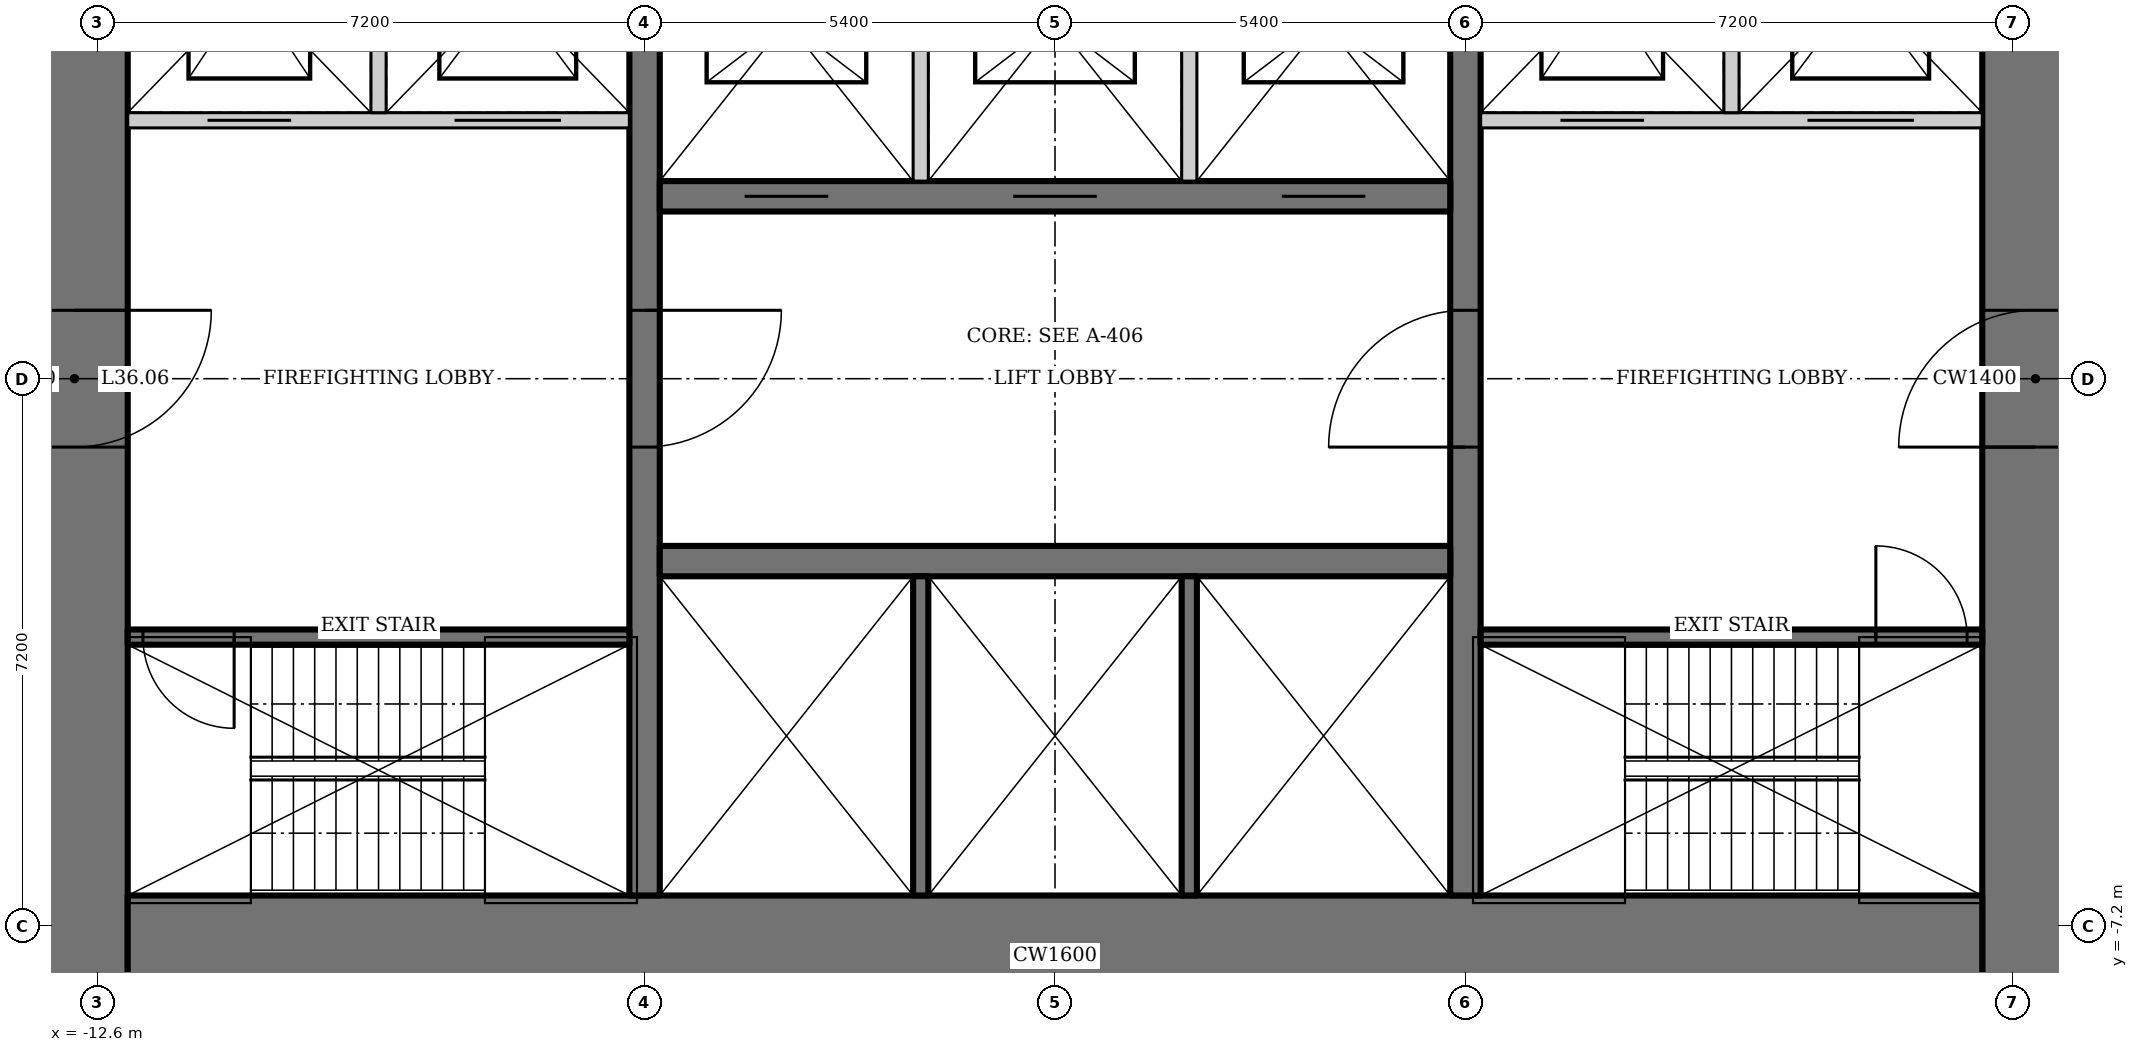
"""IFC4 building model, lengths in metres.
Left out: names, types, materials, properties, quantities, classifications, styles, units other than length and angle.
Written with IfcOpenShell. Run it as: python <this file> out.ifc"""

import sys

from ifc_helpers import new_model, si_unit, direction, frame, frame_2d, origin, place, context, subcontext, project, spatial, rectangle, extrude, element, fill, save


model = new_model("IFC4")
c1 = context("Model", 3, precision=1e-05, world=origin(), true_north=direction((0.0, 1.0)))
c2 = subcontext(c1, "Body", "Model", "MODEL_VIEW")
j1 = project(units=[si_unit("LENGTHUNIT", "METRE"), si_unit("PLANEANGLEUNIT", "RADIAN")], contexts=[c1])
p1 = place(None, origin())
s1 = spatial("IfcSite", under=j1, at=p1, CompositionType="ELEMENT")
p2 = place(p1, origin())
s2 = spatial("IfcBuilding", under=s1, at=p2, CompositionType="ELEMENT")
p3 = place(p2, frame((0.0, 0.0, 155.2)))
s3 = spatial("IfcBuildingStorey", under=s2, at=p3, CompositionType="ELEMENT", Elevation=155.2)
p4 = place(p3, frame((12.9, -13.0, 0.0), z_axis=(0.0, 0.0, 1.0), x_axis=(0.0, 1.0, 0.0)))
e1 = element("IfcWall", 1, at=p4, inside=s3, PredefinedType="SHEAR", context=c2, shape_type="SweptSolid", body=[
    extrude(rectangle(XDim=26.0, YDim=1.4, at=frame_2d((13.0, 0.0))), origin(), (0.0, 0.0, 1.0), 4.2),
])
p5 = place(p4, frame((12.1, 0.0, 0.0)))
e2 = element("IfcOpeningElement", 2, at=p5, cuts=e1, PredefinedType="OPENING", context=c2, shape_type="SweptSolid", body=[
    extrude(rectangle(XDim=1.8, YDim=2.1, at=frame_2d((0.9, 1.05))), frame((0.0, 0.71, 0.0), z_axis=(0.0, -1.0, 0.0), x_axis=(1.0, 0.0, 0.0)), (0.0, 0.0, 1.0), 1.42),
])
p6 = place(p3, frame((-12.9, 13.0, 0.0), z_axis=(0.0, 0.0, 1.0), x_axis=(0.0, -1.0, 0.0)))
e3 = element("IfcWall", 3, at=p6, inside=s3, PredefinedType="SHEAR", context=c2, shape_type="SweptSolid", body=[
    extrude(rectangle(XDim=26.0, YDim=1.4, at=frame_2d((13.0, 0.0))), origin(), (0.0, 0.0, 1.0), 4.2),
])
p7 = place(p6, frame((12.1, 0.0, 0.0)))
e4 = element("IfcOpeningElement", 4, at=p7, cuts=e3, PredefinedType="OPENING", context=c2, shape_type="SweptSolid", body=[
    extrude(rectangle(XDim=1.8, YDim=2.1, at=frame_2d((0.9, 1.05))), frame((0.0, 0.71, 0.0), z_axis=(0.0, -1.0, 0.0), x_axis=(1.0, 0.0, 0.0)), (0.0, 0.0, 1.0), 1.42),
])
p8 = place(p3, frame((-12.2, -7.6, 0.0), z_axis=(0.0, 0.0, 1.0), x_axis=(1.0, 0.0, 0.0)))
e5 = element("IfcWall", 5, at=p8, inside=s3, PredefinedType="SHEAR", context=c2, shape_type="SweptSolid", body=[
    extrude(rectangle(XDim=24.4, YDim=1.6, at=frame_2d((12.2, 0.0))), origin(), (0.0, 0.0, 1.0), 4.2),
])
p9 = place(p3, frame((5.4, -6.8, 0.0), z_axis=(0.0, 0.0, 1.0), x_axis=(0.0, 1.0, 0.0)))
e6 = element("IfcWall", 6, at=p9, inside=s3, PredefinedType="SHEAR", context=c2, shape_type="SweptSolid", body=[
    extrude(rectangle(XDim=13.6, YDim=0.4, at=frame_2d((6.8, 0.0))), origin(), (0.0, 0.0, 1.0), 4.2),
])
p10 = place(p9, frame((5.9, 0.0, 0.0)))
e7 = element("IfcOpeningElement", 7, at=p10, cuts=e6, PredefinedType="OPENING", context=c2, shape_type="SweptSolid", body=[
    extrude(rectangle(XDim=1.8, YDim=2.1, at=frame_2d((0.9, 1.05))), frame((0.0, 0.21, 0.0), z_axis=(0.0, -1.0, 0.0), x_axis=(1.0, 0.0, 0.0)), (0.0, 0.0, 1.0), 0.42),
])
p11 = place(p3, frame((-5.4, 6.8, 0.0), z_axis=(0.0, 0.0, 1.0), x_axis=(0.0, -1.0, 0.0)))
e8 = element("IfcWall", 8, at=p11, inside=s3, PredefinedType="SHEAR", context=c2, shape_type="SweptSolid", body=[
    extrude(rectangle(XDim=13.6, YDim=0.4, at=frame_2d((6.8, 0.0))), origin(), (0.0, 0.0, 1.0), 4.2),
])
p12 = place(p11, frame((5.9, 0.0, 0.0)))
e9 = element("IfcOpeningElement", 9, at=p12, cuts=e8, PredefinedType="OPENING", context=c2, shape_type="SweptSolid", body=[
    extrude(rectangle(XDim=1.8, YDim=2.1, at=frame_2d((0.9, 1.05))), frame((0.0, 0.21, 0.0), z_axis=(0.0, -1.0, 0.0), x_axis=(1.0, 0.0, 0.0)), (0.0, 0.0, 1.0), 0.42),
])
p13 = place(p3, frame((-5.2, -2.4, 0.0), z_axis=(0.0, 0.0, 1.0), x_axis=(1.0, 0.0, 0.0)))
e10 = element("IfcWall", 10, at=p13, inside=s3, PredefinedType="SHEAR", context=c2, shape_type="SweptSolid", body=[
    extrude(rectangle(XDim=10.4, YDim=0.4, at=frame_2d((5.2, 0.0))), origin(), (0.0, 0.0, 1.0), 4.2),
])
for number, where, z_axis, x_axis in (
    (11, (-1.767, -2.6, 0.0), (0.0, 0.0, 1.0), (0.0, -1.0, 0.0)),
    (12, (1.767, -2.6, 0.0), (0.0, 0.0, 1.0), (0.0, -1.0, 0.0)),
):
    element("IfcWall", number, at=place(p3, frame(where, z_axis=z_axis, x_axis=x_axis)), inside=s3, PredefinedType="SOLIDWALL", context=c2, shape_type="SweptSolid", body=[
        extrude(rectangle(XDim=4.2, YDim=0.2, at=frame_2d((2.1, 0.0))), origin(), (0.0, 0.0, 1.0), 4.2),
    ])
p14 = place(p3, frame((5.2, 2.4, 0.0), z_axis=(0.0, 0.0, 1.0), x_axis=(-1.0, 0.0, 0.0)))
e13 = element("IfcWall", 13, at=p14, inside=s3, PredefinedType="SHEAR", context=c2, shape_type="SweptSolid", body=[
    extrude(rectangle(XDim=10.4, YDim=0.4, at=frame_2d((5.2, 0.0))), origin(), (0.0, 0.0, 1.0), 4.2),
])
p15 = place(p14, frame((8.183, 0.0, 0.0)))
e14 = element("IfcOpeningElement", 14, at=p15, cuts=e13, PredefinedType="OPENING", context=c2, shape_type="SweptSolid", body=[
    extrude(rectangle(XDim=1.1, YDim=2.2, at=frame_2d((0.55, 1.1))), frame((0.0, 0.21, 0.0), z_axis=(0.0, -1.0, 0.0), x_axis=(1.0, 0.0, 0.0)), (0.0, 0.0, 1.0), 0.42),
])
p16 = place(p14, frame((4.65, 0.0, 0.0)))
e15 = element("IfcOpeningElement", 15, at=p16, cuts=e13, PredefinedType="OPENING", context=c2, shape_type="SweptSolid", body=[
    extrude(rectangle(XDim=1.1, YDim=2.2, at=frame_2d((0.55, 1.1))), frame((0.0, 0.21, 0.0), z_axis=(0.0, -1.0, 0.0), x_axis=(1.0, 0.0, 0.0)), (0.0, 0.0, 1.0), 0.42),
])
p17 = place(p14, frame((1.117, 0.0, 0.0)))
e16 = element("IfcOpeningElement", 16, at=p17, cuts=e13, PredefinedType="OPENING", context=c2, shape_type="SweptSolid", body=[
    extrude(rectangle(XDim=1.1, YDim=2.2, at=frame_2d((0.55, 1.1))), frame((0.0, 0.21, 0.0), z_axis=(0.0, -1.0, 0.0), x_axis=(1.0, 0.0, 0.0)), (0.0, 0.0, 1.0), 0.42),
])
for number, where, z_axis, x_axis in (
    (17, (-1.767, 2.6, 0.0), (0.0, 0.0, 1.0), (0.0, 1.0, 0.0)),
    (18, (1.767, 2.6, 0.0), (0.0, 0.0, 1.0), (0.0, 1.0, 0.0)),
):
    element("IfcWall", number, at=place(p3, frame(where, z_axis=z_axis, x_axis=x_axis)), inside=s3, PredefinedType="SOLIDWALL", context=c2, shape_type="SweptSolid", body=[
        extrude(rectangle(XDim=4.2, YDim=0.2, at=frame_2d((2.1, 0.0))), origin(), (0.0, 0.0, 1.0), 4.2),
    ])
p18 = place(p3, frame((5.6, -3.4, 0.0), z_axis=(0.0, 0.0, 1.0), x_axis=(1.0, 0.0, 0.0)))
e19 = element("IfcWall", 19, at=p18, inside=s3, PredefinedType="SHEAR", context=c2, shape_type="SweptSolid", body=[
    extrude(rectangle(XDim=6.6, YDim=0.2, at=frame_2d((3.3, 0.0))), origin(), (0.0, 0.0, 1.0), 4.2),
])
p19 = place(p18, frame((5.2, 0.0, 0.0)))
e20 = element("IfcOpeningElement", 20, at=p19, cuts=e19, PredefinedType="OPENING", context=c2, shape_type="SweptSolid", body=[
    extrude(rectangle(XDim=1.2, YDim=2.1, at=frame_2d((0.6, 1.05))), frame((0.0, 0.11, 0.0), z_axis=(0.0, -1.0, 0.0), x_axis=(1.0, 0.0, 0.0)), (0.0, 0.0, 1.0), 0.22),
])
p20 = place(p3, frame((12.2, 3.4, 0.0), z_axis=(0.0, 0.0, 1.0), x_axis=(-1.0, 0.0, 0.0)))
e21 = element("IfcWall", 21, at=p20, inside=s3, PredefinedType="SOLIDWALL", context=c2, shape_type="SweptSolid", body=[
    extrude(rectangle(XDim=6.6, YDim=0.2, at=frame_2d((3.3, 0.0))), origin(), (0.0, 0.0, 1.0), 4.2),
])
p21 = place(p20, frame((4.45, 0.0, 0.0)))
e22 = element("IfcOpeningElement", 22, at=p21, cuts=e21, PredefinedType="OPENING", context=c2, shape_type="SweptSolid", body=[
    extrude(rectangle(XDim=1.1, YDim=2.2, at=frame_2d((0.55, 1.1))), frame((0.0, 0.11, 0.0), z_axis=(0.0, -1.0, 0.0), x_axis=(1.0, 0.0, 0.0)), (0.0, 0.0, 1.0), 0.22),
])
p22 = place(p20, frame((0.9, 0.0, 0.0)))
e23 = element("IfcOpeningElement", 23, at=p22, cuts=e21, PredefinedType="OPENING", context=c2, shape_type="SweptSolid", body=[
    extrude(rectangle(XDim=1.4, YDim=2.2, at=frame_2d((0.7, 1.1))), frame((0.0, 0.11, 0.0), z_axis=(0.0, -1.0, 0.0), x_axis=(1.0, 0.0, 0.0)), (0.0, 0.0, 1.0), 0.22),
])
p23 = place(p3, frame((8.9, 3.5, 0.0), z_axis=(0.0, 0.0, 1.0), x_axis=(0.0, 1.0, 0.0)))
e24 = element("IfcWall", 24, at=p23, inside=s3, PredefinedType="SOLIDWALL", context=c2, shape_type="SweptSolid", body=[
    extrude(rectangle(XDim=3.3, YDim=0.2, at=frame_2d((1.65, 0.0))), origin(), (0.0, 0.0, 1.0), 4.2),
])
p24 = place(p3, frame((-5.6, -3.4, 0.0), z_axis=(0.0, 0.0, 1.0), x_axis=(-1.0, 0.0, 0.0)))
e25 = element("IfcWall", 25, at=p24, inside=s3, PredefinedType="SHEAR", context=c2, shape_type="SweptSolid", body=[
    extrude(rectangle(XDim=6.6, YDim=0.2, at=frame_2d((3.3, 0.0))), origin(), (0.0, 0.0, 1.0), 4.2),
])
p25 = place(p24, frame((5.2, 0.0, 0.0)))
e26 = element("IfcOpeningElement", 26, at=p25, cuts=e25, PredefinedType="OPENING", context=c2, shape_type="SweptSolid", body=[
    extrude(rectangle(XDim=1.2, YDim=2.1, at=frame_2d((0.6, 1.05))), frame((0.0, 0.11, 0.0), z_axis=(0.0, -1.0, 0.0), x_axis=(1.0, 0.0, 0.0)), (0.0, 0.0, 1.0), 0.22),
])
p26 = place(p3, frame((-12.2, 3.4, 0.0), z_axis=(0.0, 0.0, 1.0), x_axis=(1.0, 0.0, 0.0)))
e27 = element("IfcWall", 27, at=p26, inside=s3, PredefinedType="SOLIDWALL", context=c2, shape_type="SweptSolid", body=[
    extrude(rectangle(XDim=6.6, YDim=0.2, at=frame_2d((3.3, 0.0))), origin(), (0.0, 0.0, 1.0), 4.2),
])
p27 = place(p26, frame((1.05, 0.0, 0.0)))
e28 = element("IfcOpeningElement", 28, at=p27, cuts=e27, PredefinedType="OPENING", context=c2, shape_type="SweptSolid", body=[
    extrude(rectangle(XDim=1.1, YDim=2.2, at=frame_2d((0.55, 1.1))), frame((0.0, 0.11, 0.0), z_axis=(0.0, -1.0, 0.0), x_axis=(1.0, 0.0, 0.0)), (0.0, 0.0, 1.0), 0.22),
])
p28 = place(p26, frame((4.3, 0.0, 0.0)))
e29 = element("IfcOpeningElement", 29, at=p28, cuts=e27, PredefinedType="OPENING", context=c2, shape_type="SweptSolid", body=[
    extrude(rectangle(XDim=1.4, YDim=2.2, at=frame_2d((0.7, 1.1))), frame((0.0, 0.11, 0.0), z_axis=(0.0, -1.0, 0.0), x_axis=(1.0, 0.0, 0.0)), (0.0, 0.0, 1.0), 0.22),
])
p29 = place(p3, frame((-8.9, 3.5, 0.0), z_axis=(0.0, 0.0, 1.0), x_axis=(0.0, 1.0, 0.0)))
e30 = element("IfcWall", 30, at=p29, inside=s3, PredefinedType="SOLIDWALL", context=c2, shape_type="SweptSolid", body=[
    extrude(rectangle(XDim=3.3, YDim=0.2, at=frame_2d((1.65, 0.0))), origin(), (0.0, 0.0, 1.0), 4.2),
])
p30 = place(p10, origin())
e31 = element("IfcDoor", 31, at=p30, inside=s3, OperationType="DOUBLE_DOOR_DOUBLE_SWING", PredefinedType="DOOR", context=c2, shape_type="SweptSolid", body=[
    extrude(rectangle(XDim=1.8, YDim=2.1, at=frame_2d((0.9, 1.05))), frame((0.0, 0.025, 0.0), z_axis=(0.0, -1.0, 0.0), x_axis=(1.0, 0.0, 0.0)), (0.0, 0.0, 1.0), 0.05),
])
fill(e7, e31)
p31 = place(p12, origin())
e32 = element("IfcDoor", 32, at=p31, inside=s3, OperationType="DOUBLE_DOOR_DOUBLE_SWING", PredefinedType="DOOR", context=c2, shape_type="SweptSolid", body=[
    extrude(rectangle(XDim=1.8, YDim=2.1, at=frame_2d((0.9, 1.05))), frame((0.0, 0.025, 0.0), z_axis=(0.0, -1.0, 0.0), x_axis=(1.0, 0.0, 0.0)), (0.0, 0.0, 1.0), 0.05),
])
fill(e9, e32)
p32 = place(p19, origin())
e33 = element("IfcDoor", 33, at=p32, inside=s3, OperationType="SINGLE_SWING_RIGHT", PredefinedType="DOOR", context=c2, shape_type="SweptSolid", body=[
    extrude(rectangle(XDim=1.2, YDim=2.1, at=frame_2d((0.6, 1.05))), frame((0.0, 0.025, 0.0), z_axis=(0.0, -1.0, 0.0), x_axis=(1.0, 0.0, 0.0)), (0.0, 0.0, 1.0), 0.05),
])
fill(e20, e33)
p33 = place(p25, origin())
e34 = element("IfcDoor", 34, at=p33, inside=s3, OperationType="SINGLE_SWING_RIGHT", PredefinedType="DOOR", context=c2, shape_type="SweptSolid", body=[
    extrude(rectangle(XDim=1.2, YDim=2.1, at=frame_2d((0.6, 1.05))), frame((0.0, 0.025, 0.0), z_axis=(0.0, -1.0, 0.0), x_axis=(1.0, 0.0, 0.0)), (0.0, 0.0, 1.0), 0.05),
])
fill(e26, e34)
p34 = place(p5, origin())
e35 = element("IfcDoor", 35, at=p34, inside=s3, OperationType="DOUBLE_DOOR_DOUBLE_SWING", PredefinedType="DOOR", context=c2, shape_type="SweptSolid", body=[
    extrude(rectangle(XDim=1.8, YDim=2.1, at=frame_2d((0.9, 1.05))), frame((0.0, 0.025, 0.0), z_axis=(0.0, -1.0, 0.0), x_axis=(1.0, 0.0, 0.0)), (0.0, 0.0, 1.0), 0.05),
])
fill(e2, e35)
p35 = place(p7, origin())
e36 = element("IfcDoor", 36, at=p35, inside=s3, OperationType="DOUBLE_DOOR_DOUBLE_SWING", PredefinedType="DOOR", context=c2, shape_type="SweptSolid", body=[
    extrude(rectangle(XDim=1.8, YDim=2.1, at=frame_2d((0.9, 1.05))), frame((0.0, 0.025, 0.0), z_axis=(0.0, -1.0, 0.0), x_axis=(1.0, 0.0, 0.0)), (0.0, 0.0, 1.0), 0.05),
])
fill(e4, e36)
p36 = place(p15, origin())
e37 = element("IfcDoor", 37, at=p36, inside=s3, OperationType="DOUBLE_DOOR_SLIDING", PredefinedType="DOOR", context=c2, shape_type="SweptSolid", body=[
    extrude(rectangle(XDim=1.1, YDim=2.2, at=frame_2d((0.55, 1.1))), frame((0.0, 0.025, 0.0), z_axis=(0.0, -1.0, 0.0), x_axis=(1.0, 0.0, 0.0)), (0.0, 0.0, 1.0), 0.05),
])
fill(e14, e37)
p37 = place(p16, origin())
e38 = element("IfcDoor", 38, at=p37, inside=s3, OperationType="DOUBLE_DOOR_SLIDING", PredefinedType="DOOR", context=c2, shape_type="SweptSolid", body=[
    extrude(rectangle(XDim=1.1, YDim=2.2, at=frame_2d((0.55, 1.1))), frame((0.0, 0.025, 0.0), z_axis=(0.0, -1.0, 0.0), x_axis=(1.0, 0.0, 0.0)), (0.0, 0.0, 1.0), 0.05),
])
fill(e15, e38)
p38 = place(p17, origin())
e39 = element("IfcDoor", 39, at=p38, inside=s3, OperationType="DOUBLE_DOOR_SLIDING", PredefinedType="DOOR", context=c2, shape_type="SweptSolid", body=[
    extrude(rectangle(XDim=1.1, YDim=2.2, at=frame_2d((0.55, 1.1))), frame((0.0, 0.025, 0.0), z_axis=(0.0, -1.0, 0.0), x_axis=(1.0, 0.0, 0.0)), (0.0, 0.0, 1.0), 0.05),
])
fill(e16, e39)
p39 = place(p27, origin())
e40 = element("IfcDoor", 40, at=p39, inside=s3, OperationType="DOUBLE_DOOR_SLIDING", PredefinedType="DOOR", context=c2, shape_type="SweptSolid", body=[
    extrude(rectangle(XDim=1.1, YDim=2.2, at=frame_2d((0.55, 1.1))), frame((0.0, 0.025, 0.0), z_axis=(0.0, -1.0, 0.0), x_axis=(1.0, 0.0, 0.0)), (0.0, 0.0, 1.0), 0.05),
])
fill(e28, e40)
p40 = place(p28, origin())
e41 = element("IfcDoor", 41, at=p40, inside=s3, OperationType="DOUBLE_DOOR_SLIDING", PredefinedType="DOOR", context=c2, shape_type="SweptSolid", body=[
    extrude(rectangle(XDim=1.4, YDim=2.2, at=frame_2d((0.7, 1.1))), frame((0.0, 0.025, 0.0), z_axis=(0.0, -1.0, 0.0), x_axis=(1.0, 0.0, 0.0)), (0.0, 0.0, 1.0), 0.05),
])
fill(e29, e41)
p41 = place(p21, origin())
e42 = element("IfcDoor", 42, at=p41, inside=s3, OperationType="DOUBLE_DOOR_SLIDING", PredefinedType="DOOR", context=c2, shape_type="SweptSolid", body=[
    extrude(rectangle(XDim=1.1, YDim=2.2, at=frame_2d((0.55, 1.1))), frame((0.0, 0.025, 0.0), z_axis=(0.0, -1.0, 0.0), x_axis=(1.0, 0.0, 0.0)), (0.0, 0.0, 1.0), 0.05),
])
fill(e22, e42)
p42 = place(p22, origin())
e43 = element("IfcDoor", 43, at=p42, inside=s3, OperationType="DOUBLE_DOOR_SLIDING", PredefinedType="DOOR", context=c2, shape_type="SweptSolid", body=[
    extrude(rectangle(XDim=1.4, YDim=2.2, at=frame_2d((0.7, 1.1))), frame((0.0, 0.025, 0.0), z_axis=(0.0, -1.0, 0.0), x_axis=(1.0, 0.0, 0.0)), (0.0, 0.0, 1.0), 0.05),
])
fill(e23, e43)
save(model, sys.argv[1])
